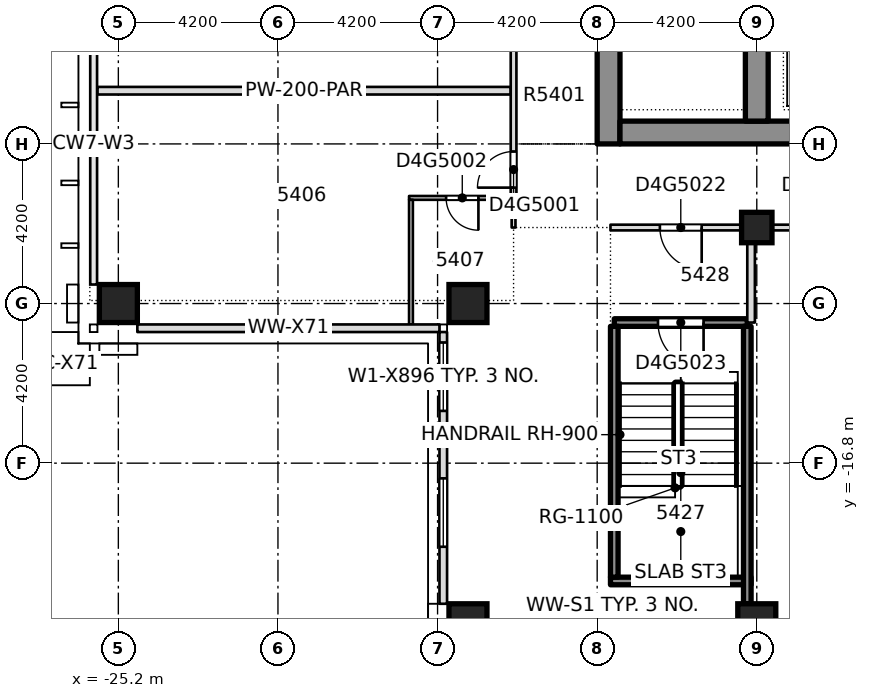
"""IFC4 building model, lengths in metres.
Left out: names, types, materials, properties, quantities, classifications, styles, units other than length and angle.
Written with IfcOpenShell. Run it as: python <this file> out.ifc"""

import sys

from ifc_helpers import new_model, si_unit, direction, frame, frame_2d, origin, origin_2d, place, context, subcontext, project, spatial, rectangle, extrude, element, fill, save


model = new_model("IFC4")
c1 = context("Model", 3, precision=1e-05, world=origin(), true_north=direction((0.0, 1.0)))
c2 = subcontext(c1, "Body", "Model", "MODEL_VIEW")
j1 = project(units=[si_unit("LENGTHUNIT", "METRE"), si_unit("PLANEANGLEUNIT", "RADIAN")], contexts=[c1])
p1 = place(None, origin())
s1 = spatial("IfcSite", under=j1, at=p1, CompositionType="ELEMENT")
p2 = place(p1, origin())
s2 = spatial("IfcBuilding", under=s1, at=p2, CompositionType="ELEMENT")
p3 = place(p2, frame((0.0, 0.0, 206.6)))
s3 = spatial("IfcBuildingStorey", under=s2, at=p3, CompositionType="ELEMENT", Elevation=206.6)
p4 = place(p3, frame((-12.3, -8.4, -0.4), z_axis=(0.0, 0.0, 1.0), x_axis=(0.0, 1.0, 0.0)))
e1 = element("IfcWall", 1, at=p4, inside=s3, PredefinedType="SHEAR", context=c2, shape_type="SweptSolid", body=[
    extrude(rectangle(XDim=30.15, YDim=0.6, at=frame_2d((15.075, 0.0))), origin(), (0.0, 0.0, 1.0), 3.45),
])
p5 = place(p4, frame((4.113, 0.0, 0.4)))
e2 = element("IfcOpeningElement", 2, at=p5, cuts=e1, PredefinedType="OPENING", context=c2, shape_type="SweptSolid", body=[
    extrude(rectangle(XDim=0.95, YDim=2.1, at=frame_2d((0.475, 1.05))), frame((0.0, 0.31, 0.0), z_axis=(0.0, -1.0, 0.0), x_axis=(1.0, 0.0, 0.0)), (0.0, 0.0, 1.0), 0.62),
])
p6 = place(p4, frame((9.89, 0.0, 0.4)))
e3 = element("IfcOpeningElement", 3, at=p6, cuts=e1, PredefinedType="OPENING", context=c2, shape_type="SweptSolid", body=[
    extrude(rectangle(XDim=0.95, YDim=2.1, at=frame_2d((0.475, 1.05))), frame((0.0, 0.31, 0.0), z_axis=(0.0, -1.0, 0.0), x_axis=(1.0, 0.0, 0.0)), (0.0, 0.0, 1.0), 0.62),
])
p7 = place(p4, frame((15.052, 0.0, 0.4)))
e4 = element("IfcOpeningElement", 4, at=p7, cuts=e1, PredefinedType="OPENING", context=c2, shape_type="SweptSolid", body=[
    extrude(rectangle(XDim=0.95, YDim=2.1, at=frame_2d((0.475, 1.05))), frame((0.0, 0.31, 0.0), z_axis=(0.0, -1.0, 0.0), x_axis=(1.0, 0.0, 0.0)), (0.0, 0.0, 1.0), 0.62),
])
p8 = place(p4, frame((22.144, 0.0, 0.4)))
e5 = element("IfcOpeningElement", 5, at=p8, cuts=e1, PredefinedType="OPENING", context=c2, shape_type="SweptSolid", body=[
    extrude(rectangle(XDim=0.95, YDim=2.1, at=frame_2d((0.475, 1.05))), frame((0.0, 0.31, 0.0), z_axis=(0.0, -1.0, 0.0), x_axis=(1.0, 0.0, 0.0)), (0.0, 0.0, 1.0), 0.62),
])
p9 = place(p4, frame((24.998, 0.0, 0.4)))
e6 = element("IfcOpeningElement", 6, at=p9, cuts=e1, PredefinedType="OPENING", context=c2, shape_type="SweptSolid", body=[
    extrude(rectangle(XDim=0.95, YDim=2.1, at=frame_2d((0.475, 1.05))), frame((0.0, 0.31, 0.0), z_axis=(0.0, -1.0, 0.0), x_axis=(1.0, 0.0, 0.0)), (0.0, 0.0, 1.0), 0.62),
])
p10 = place(p4, frame((27.605, 0.0, 0.4)))
e7 = element("IfcOpeningElement", 7, at=p10, cuts=e1, PredefinedType="OPENING", context=c2, shape_type="SweptSolid", body=[
    extrude(rectangle(XDim=0.95, YDim=2.1, at=frame_2d((0.475, 1.05))), frame((0.0, 0.31, 0.0), z_axis=(0.0, -1.0, 0.0), x_axis=(1.0, 0.0, 0.0)), (0.0, 0.0, 1.0), 0.62),
])
p11 = place(p4, frame((19.3, 0.0, 0.4)))
e8 = element("IfcOpeningElement", 8, at=p11, cuts=e1, PredefinedType="OPENING", context=c2, shape_type="SweptSolid", body=[
    extrude(rectangle(XDim=1.2, YDim=2.1, at=frame_2d((0.6, 1.05))), frame((0.0, 0.31, 0.0), z_axis=(0.0, -1.0, 0.0), x_axis=(1.0, 0.0, 0.0)), (0.0, 0.0, 1.0), 0.62),
])
p12 = place(p3, frame((-12.0, -8.1, -0.4), z_axis=(0.0, 0.0, 1.0), x_axis=(1.0, 0.0, 0.0)))
e9 = element("IfcWall", 9, at=p12, inside=s3, PredefinedType="SHEAR", context=c2, shape_type="SweptSolid", body=[
    extrude(rectangle(XDim=24.0, YDim=0.6, at=frame_2d((12.0, 0.0))), origin(), (0.0, 0.0, 1.0), 3.45),
])
p13 = place(p12, frame((7.25, 0.0, 0.4)))
e10 = element("IfcOpeningElement", 10, at=p13, cuts=e9, PredefinedType="OPENING", context=c2, shape_type="SweptSolid", body=[
    extrude(rectangle(XDim=1.8, YDim=2.1, at=frame_2d((0.9, 1.05))), frame((0.0, 0.31, 0.0), z_axis=(0.0, -1.0, 0.0), x_axis=(1.0, 0.0, 0.0)), (0.0, 0.0, 1.0), 0.62),
])
p14 = place(p12, frame((14.95, 0.0, 0.4)))
e11 = element("IfcOpeningElement", 11, at=p14, cuts=e9, PredefinedType="OPENING", context=c2, shape_type="SweptSolid", body=[
    extrude(rectangle(XDim=1.8, YDim=2.1, at=frame_2d((0.9, 1.05))), frame((0.0, 0.31, 0.0), z_axis=(0.0, -1.0, 0.0), x_axis=(1.0, 0.0, 0.0)), (0.0, 0.0, 1.0), 0.62),
])
p15 = place(p3, frame((-8.4, -7.8, -0.4), z_axis=(0.0, 0.0, 1.0), x_axis=(0.0, 1.0, 0.0)))
e12 = element("IfcWall", 12, at=p15, inside=s3, PredefinedType="SHEAR", context=c2, shape_type="SweptSolid", body=[
    extrude(rectangle(XDim=28.95, YDim=0.6, at=frame_2d((14.475, 0.0))), origin(), (0.0, 0.0, 1.0), 3.45),
])
p16 = place(p15, frame((18.7, 0.0, 0.4)))
e13 = element("IfcOpeningElement", 13, at=p16, cuts=e12, PredefinedType="OPENING", context=c2, shape_type="SweptSolid", body=[
    extrude(rectangle(XDim=1.2, YDim=2.1, at=frame_2d((0.6, 1.05))), frame((0.0, 0.31, 0.0), z_axis=(0.0, -1.0, 0.0), x_axis=(1.0, 0.0, 0.0)), (0.0, 0.0, 1.0), 0.62),
])
for number, where, z_axis, x_axis in (
    (14, (-16.0, -21.0, -0.4), (0.0, 0.0, 1.0), (1.0, 0.0, 0.0)),
    (15, (-8.4, -21.0, -0.4), (0.0, 0.0, 1.0), (1.0, 0.0, 0.0)),
    (16, (-25.2, -12.6, -0.4), (0.0, 0.0, 1.0), (1.0, 0.0, 0.0)),
    (17, (-16.0, -12.6, -0.4), (0.0, 0.0, 1.0), (1.0, 0.0, 0.0)),
):
    element("IfcColumn", number, at=place(p3, frame(where, z_axis=z_axis, x_axis=x_axis)), inside=s3, PredefinedType="COLUMN", context=c2, shape_type="SweptSolid", body=[
        extrude(rectangle(XDim=1.0, YDim=1.0, at=origin_2d()), origin(), (0.0, 0.0, 1.0), 3.45),
    ])
p17 = place(p3, frame((-8.4, -10.6, -0.4), z_axis=(0.0, 0.0, 1.0), x_axis=(1.0, 0.0, 0.0)))
e18 = element("IfcColumn", 18, at=p17, inside=s3, PredefinedType="COLUMN", context=c2, shape_type="SweptSolid", body=[
    extrude(rectangle(XDim=0.8, YDim=0.8, at=origin_2d()), origin(), (0.0, 0.0, 1.0), 3.45),
])
p18 = place(p3, frame((-12.15, -13.1, 0.0), z_axis=(0.0, 0.0, 1.0), x_axis=(1.0, 0.0, 0.0)))
e19 = element("IfcWall", 19, at=p18, inside=s3, PredefinedType="SOLIDWALL", context=c2, shape_type="SweptSolid", body=[
    extrude(rectangle(XDim=3.5, YDim=0.2, at=frame_2d((1.75, 0.0))), origin(), (0.0, 0.0, 1.0), 3.05),
])
p19 = place(p18, frame((1.15, 0.0, 0.0)))
e20 = element("IfcOpeningElement", 20, at=p19, cuts=e19, PredefinedType="OPENING", context=c2, shape_type="SweptSolid", body=[
    extrude(rectangle(XDim=1.2, YDim=2.1, at=frame_2d((0.6, 1.05))), frame((0.0, 0.11, 0.0), z_axis=(0.0, -1.0, 0.0), x_axis=(1.0, 0.0, 0.0)), (0.0, 0.0, 1.0), 0.22),
])
p20 = place(p3, frame((-12.25, -10.6, 0.0), z_axis=(0.0, 0.0, 1.0), x_axis=(1.0, 0.0, 0.0)))
e21 = element("IfcWall", 21, at=p20, inside=s3, PredefinedType="PARTITIONING", context=c2, shape_type="SweptSolid", body=[
    extrude(rectangle(XDim=7.75, YDim=0.15, at=frame_2d((3.875, 0.0))), origin(), (0.0, 0.0, 1.0), 3.05),
])
p21 = place(p20, frame((5.225, 0.0, 0.0)))
e22 = element("IfcOpeningElement", 22, at=p21, cuts=e21, PredefinedType="OPENING", context=c2, shape_type="SweptSolid", body=[
    extrude(rectangle(XDim=0.95, YDim=2.1, at=frame_2d((0.475, 1.05))), frame((0.0, 0.085, 0.0), z_axis=(0.0, -1.0, 0.0), x_axis=(1.0, 0.0, 0.0)), (0.0, 0.0, 1.0), 0.17),
])
p22 = place(p20, frame((1.3, 0.0, 0.0)))
e23 = element("IfcOpeningElement", 23, at=p22, cuts=e21, PredefinedType="OPENING", context=c2, shape_type="SweptSolid", body=[
    extrude(rectangle(XDim=1.1, YDim=2.1, at=frame_2d((0.55, 1.05))), frame((0.0, 0.085, 0.0), z_axis=(0.0, -1.0, 0.0), x_axis=(1.0, 0.0, 0.0)), (0.0, 0.0, 1.0), 0.17),
])
p23 = place(p3, frame((-17.55, -9.82, 0.0), z_axis=(0.0, 0.0, 1.0), x_axis=(1.0, 0.0, 0.0)))
e24 = element("IfcWall", 24, at=p23, inside=s3, PredefinedType="PARTITIONING", context=c2, shape_type="SweptSolid", body=[
    extrude(rectangle(XDim=2.825, YDim=0.1, at=frame_2d((1.413, 0.0))), origin(), (0.0, 0.0, 1.0), 3.05),
])
p24 = place(p23, frame((0.975, 0.0, 0.0)))
e25 = element("IfcOpeningElement", 25, at=p24, cuts=e24, PredefinedType="OPENING", context=c2, shape_type="SweptSolid", body=[
    extrude(rectangle(XDim=0.85, YDim=2.1, at=frame_2d((0.425, 1.05))), frame((0.0, 0.06, 0.0), z_axis=(0.0, -1.0, 0.0), x_axis=(1.0, 0.0, 0.0)), (0.0, 0.0, 1.0), 0.12),
])
p25 = place(p3, frame((-25.75, -7.0, 0.0), z_axis=(0.0, 0.0, 1.0), x_axis=(1.0, 0.0, 0.0)))
e26 = element("IfcWall", 26, at=p25, inside=s3, PredefinedType="PARTITIONING", context=c2, shape_type="SweptSolid", body=[
    extrude(rectangle(XDim=10.875, YDim=0.2, at=frame_2d((5.438, 0.0))), origin(), (0.0, 0.0, 1.0), 3.05),
])
p26 = place(p3, frame((-17.5, -13.15, 0.0), z_axis=(0.0, 0.0, 1.0), x_axis=(0.0, 1.0, 0.0)))
e27 = element("IfcWall", 27, at=p26, inside=s3, PredefinedType="PARTITIONING", context=c2, shape_type="SweptSolid", body=[
    extrude(rectangle(XDim=3.28, YDim=0.1, at=frame_2d((1.64, 0.0))), origin(), (0.0, 0.0, 1.0), 3.05),
])
p27 = place(p3, frame((-14.8, -10.6, 0.0), z_axis=(0.0, 0.0, 1.0), x_axis=(0.0, 1.0, 0.0)))
e28 = element("IfcWall", 28, at=p27, inside=s3, PredefinedType="PARTITIONING", context=c2, shape_type="SweptSolid", body=[
    extrude(rectangle(XDim=0.73, YDim=0.1, at=frame_2d((0.365, 0.0))), origin(), (0.0, 0.0, 1.0), 3.05),
])
p28 = place(p3, frame((-14.8, -9.77, 0.0), z_axis=(0.0, 0.0, 1.0), x_axis=(0.0, 1.0, 0.0)))
e29 = element("IfcWall", 29, at=p28, inside=s3, PredefinedType="PARTITIONING", context=c2, shape_type="SweptSolid", body=[
    extrude(rectangle(XDim=18.095, YDim=0.15, at=frame_2d((9.047, 0.0))), origin(), (0.0, 0.0, 1.0), 3.05),
])
p29 = place(p28, frame((0.22, 0.0, 0.0)))
e30 = element("IfcOpeningElement", 30, at=p29, cuts=e29, PredefinedType="OPENING", context=c2, shape_type="SweptSolid", body=[
    extrude(rectangle(XDim=0.95, YDim=2.1, at=frame_2d((0.475, 1.05))), frame((0.0, 0.085, 0.0), z_axis=(0.0, -1.0, 0.0), x_axis=(1.0, 0.0, 0.0)), (0.0, 0.0, 1.0), 0.17),
])
p30 = place(p28, frame((9.22, 0.0, 0.0)))
e31 = element("IfcOpeningElement", 31, at=p30, cuts=e29, PredefinedType="OPENING", context=c2, shape_type="SweptSolid", body=[
    extrude(rectangle(XDim=1.1, YDim=2.1, at=frame_2d((0.55, 1.05))), frame((0.0, 0.085, 0.0), z_axis=(0.0, -1.0, 0.0), x_axis=(1.0, 0.0, 0.0)), (0.0, 0.0, 1.0), 0.17),
])
p31 = place(p28, frame((4.07, 0.0, 0.0)))
e32 = element("IfcOpeningElement", 32, at=p31, cuts=e29, PredefinedType="OPENING", context=c2, shape_type="SweptSolid", body=[
    extrude(rectangle(XDim=1.0, YDim=2.1, at=frame_2d((0.5, 1.05))), frame((0.0, 0.085, 0.0), z_axis=(0.0, -1.0, 0.0), x_axis=(1.0, 0.0, 0.0)), (0.0, 0.0, 1.0), 0.17),
])
p32 = place(p3, frame((-8.55, -13.1, 0.0), z_axis=(0.0, 0.0, 1.0), x_axis=(0.0, 1.0, 0.0)))
e33 = element("IfcWall", 33, at=p32, inside=s3, PredefinedType="PARTITIONING", context=c2, shape_type="SweptSolid", body=[
    extrude(rectangle(XDim=2.425, YDim=0.2, at=frame_2d((1.212, 0.0))), origin(), (0.0, 0.0, 1.0), 3.05),
])
p33 = place(p3, frame((-24.7, -13.25, 0.0), z_axis=(0.0, 0.0, 1.0), x_axis=(1.0, 0.0, 0.0)))
e34 = element("IfcWall", 34, at=p33, inside=s3, PredefinedType="STANDARD", context=c2, shape_type="SweptSolid", body=[
    extrude(rectangle(XDim=7.95, YDim=0.2, at=frame_2d((3.975, 0.0))), origin(), (0.0, 0.0, 1.0), 3.05),
])
p34 = place(p3, frame((-16.65, -13.35, 0.0), z_axis=(0.0, 0.0, 1.0), x_axis=(0.0, -1.0, 0.0)))
e35 = element("IfcWall", 35, at=p34, inside=s3, PredefinedType="STANDARD", context=c2, shape_type="SweptSolid", body=[
    extrude(rectangle(XDim=7.15, YDim=0.2, at=frame_2d((3.575, 0.0))), origin(), (0.0, 0.0, 1.0), 3.05),
])
p35 = place(p34, frame((3.85, 0.0, 0.2)))
e36 = element("IfcOpeningElement", 36, at=p35, cuts=e35, PredefinedType="OPENING", context=c2, shape_type="SweptSolid", body=[
    extrude(rectangle(XDim=1.8, YDim=2.65, at=frame_2d((0.9, 1.325))), frame((0.0, 0.11, 0.0), z_axis=(0.0, -1.0, 0.0), x_axis=(1.0, 0.0, 0.0)), (0.0, 0.0, 1.0), 0.22),
])
p36 = place(p34, frame((0.275, 0.0, 0.2)))
e37 = element("IfcOpeningElement", 37, at=p36, cuts=e35, PredefinedType="OPENING", context=c2, shape_type="SweptSolid", body=[
    extrude(rectangle(XDim=1.8, YDim=2.65, at=frame_2d((0.9, 1.325))), frame((0.0, 0.11, 0.0), z_axis=(0.0, -1.0, 0.0), x_axis=(1.0, 0.0, 0.0)), (0.0, 0.0, 1.0), 0.22),
])
p37 = place(p3, frame((-12.25, -19.9, 0.0), z_axis=(0.0, 0.0, 1.0), x_axis=(1.0, 0.0, 0.0)))
e38 = element("IfcWall", 38, at=p37, inside=s3, PredefinedType="SOLIDWALL", context=c2, shape_type="SweptSolid", body=[
    extrude(rectangle(XDim=3.7, YDim=0.2, at=frame_2d((1.85, 0.0))), origin(), (0.0, 0.0, 1.0), 3.05),
])
p38 = place(p3, frame((-12.15, -19.8, 0.0), z_axis=(0.0, 0.0, 1.0), x_axis=(0.0, 1.0, 0.0)))
e39 = element("IfcWall", 39, at=p38, inside=s3, PredefinedType="SOLIDWALL", context=c2, shape_type="SweptSolid", body=[
    extrude(rectangle(XDim=6.6, YDim=0.2, at=frame_2d((3.3, 0.0))), origin(), (0.0, 0.0, 1.0), 3.05),
])
p39 = place(p3, frame((-8.65, -20.5, 0.0), z_axis=(0.0, 0.0, 1.0), x_axis=(0.0, 1.0, 0.0)))
e40 = element("IfcWall", 40, at=p39, inside=s3, PredefinedType="SOLIDWALL", context=c2, shape_type="SweptSolid", body=[
    extrude(rectangle(XDim=7.3, YDim=0.2, at=frame_2d((3.65, 0.0))), origin(), (0.0, 0.0, 1.0), 3.05),
])
p40 = place(p29, origin())
e41 = element("IfcDoor", 41, at=p40, inside=s3, OperationType="SINGLE_SWING_LEFT", PredefinedType="DOOR", context=c2, shape_type="SweptSolid", body=[
    extrude(rectangle(XDim=0.95, YDim=2.1, at=frame_2d((0.475, 1.05))), frame((0.0, 0.025, 0.0), z_axis=(0.0, -1.0, 0.0), x_axis=(1.0, 0.0, 0.0)), (0.0, 0.0, 1.0), 0.05),
])
fill(e30, e41)
p41 = place(p24, origin())
e42 = element("IfcDoor", 42, at=p41, inside=s3, OperationType="SINGLE_SWING_RIGHT", PredefinedType="DOOR", context=c2, shape_type="SweptSolid", body=[
    extrude(rectangle(XDim=0.85, YDim=2.1, at=frame_2d((0.425, 1.05))), frame((0.0, 0.025, 0.0), z_axis=(0.0, -1.0, 0.0), x_axis=(1.0, 0.0, 0.0)), (0.0, 0.0, 1.0), 0.05),
])
fill(e25, e42)
p42 = place(p22, origin())
e43 = element("IfcDoor", 43, at=p42, inside=s3, OperationType="SINGLE_SWING_RIGHT", PredefinedType="DOOR", context=c2, shape_type="SweptSolid", body=[
    extrude(rectangle(XDim=1.1, YDim=2.1, at=frame_2d((0.55, 1.05))), frame((0.0, 0.025, 0.0), z_axis=(0.0, -1.0, 0.0), x_axis=(1.0, 0.0, 0.0)), (0.0, 0.0, 1.0), 0.05),
])
fill(e23, e43)
p43 = place(p19, origin())
e44 = element("IfcDoor", 44, at=p43, inside=s3, OperationType="SINGLE_SWING_RIGHT", PredefinedType="DOOR", context=c2, shape_type="SweptSolid", body=[
    extrude(rectangle(XDim=1.2, YDim=2.1, at=frame_2d((0.6, 1.05))), frame((0.0, 0.025, 0.0), z_axis=(0.0, -1.0, 0.0), x_axis=(1.0, 0.0, 0.0)), (0.0, 0.0, 1.0), 0.05),
])
fill(e20, e44)
p44 = place(p35, origin())
e45 = element("IfcWindow", 45, at=p44, inside=s3, PartitioningType="SINGLE_PANEL", PredefinedType="WINDOW", context=c2, shape_type="SweptSolid", body=[
    extrude(rectangle(XDim=1.8, YDim=2.65, at=frame_2d((0.9, 1.325))), frame((0.0, 0.03, 0.0), z_axis=(0.0, -1.0, 0.0), x_axis=(1.0, 0.0, 0.0)), (0.0, 0.0, 1.0), 0.06),
])
fill(e36, e45)
p45 = place(p36, origin())
e46 = element("IfcWindow", 46, at=p45, inside=s3, PartitioningType="SINGLE_PANEL", PredefinedType="WINDOW", context=c2, shape_type="SweptSolid", body=[
    extrude(rectangle(XDim=1.8, YDim=2.65, at=frame_2d((0.9, 1.325))), frame((0.0, 0.03, 0.0), z_axis=(0.0, -1.0, 0.0), x_axis=(1.0, 0.0, 0.0)), (0.0, 0.0, 1.0), 0.06),
])
fill(e37, e46)
save(model, sys.argv[1])
